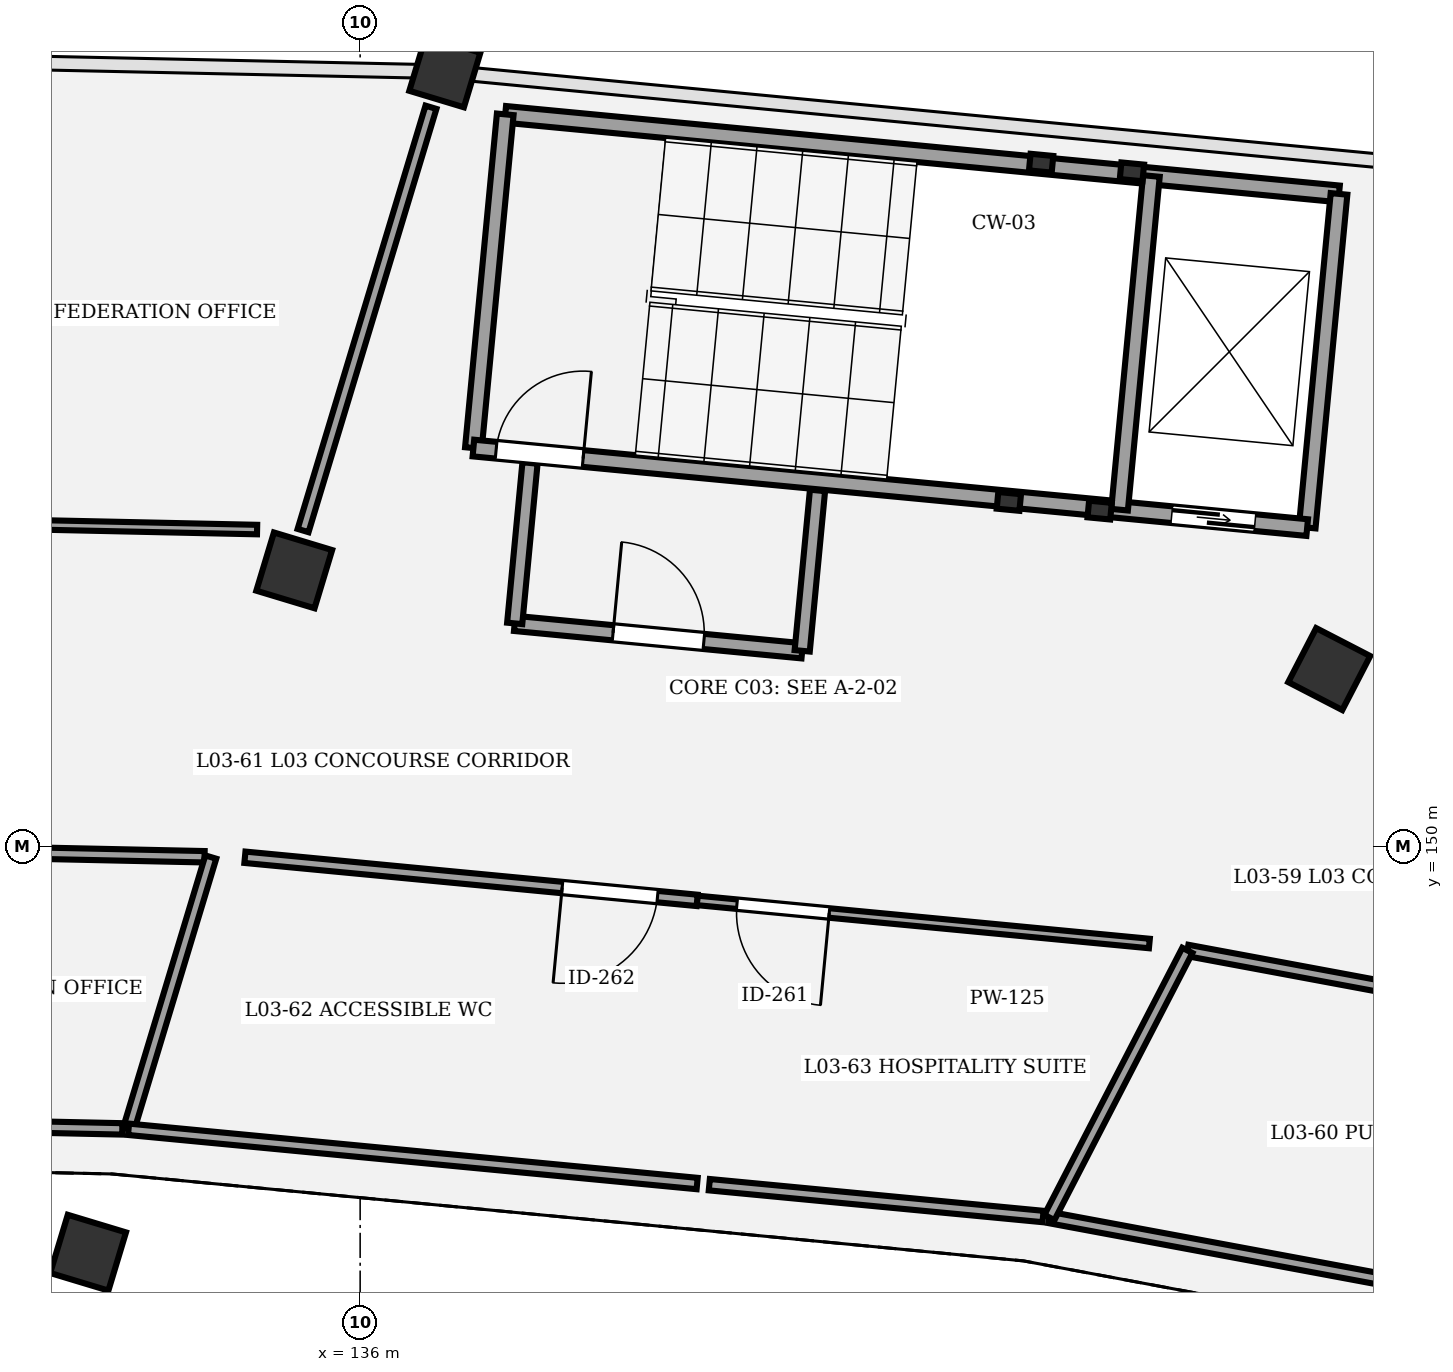
"""IFC4 building model, lengths in metres.
Left out: names, types, materials, properties, quantities, classifications, styles, units other than length and angle.
Written with IfcOpenShell. Run it as: python <this file> out.ifc"""

import sys

from ifc_helpers import new_model, si_unit, direction, frame, frame_2d, origin, origin_2d, place, context, subcontext, project, spatial, rectangle, extrude, element, fill, save


model = new_model("IFC4")
c1 = context("Model", 3, precision=1e-05, world=origin(), true_north=direction((0.0, 1.0)))
c2 = subcontext(c1, "Body", "Model", "MODEL_VIEW")
j1 = project(units=[si_unit("LENGTHUNIT", "METRE"), si_unit("PLANEANGLEUNIT", "RADIAN")], contexts=[c1])
p1 = place(None, origin())
s1 = spatial("IfcSite", under=j1, at=p1, CompositionType="ELEMENT")
p2 = place(p1, origin())
s2 = spatial("IfcBuilding", under=s1, at=p2, CompositionType="ELEMENT")
p3 = place(p2, frame((0.0, 0.0, 14.7)))
s3 = spatial("IfcBuildingStorey", under=s2, at=p3, CompositionType="ELEMENT", Elevation=14.7)
p4 = place(p3, frame((148.75, 152.335, 0.0), z_axis=(0.0, 0.0, 1.0), x_axis=(0.458959712465, 0.888457079624, 0.0)))
e1 = element("IfcColumn", 1, at=p4, inside=s3, PredefinedType="COLUMN", context=c2, shape_type="SweptSolid", body=[
    extrude(rectangle(XDim=0.8, YDim=0.8, at=origin_2d()), origin(), (0.0, 0.0, 1.0), 4.5),
])
p5 = place(p3, frame((132.42, 144.657, 0.0), z_axis=(0.0, 0.0, 1.0), x_axis=(0.289198876314, 0.957269037387, 0.0)))
e2 = element("IfcColumn", 2, at=p5, inside=s3, PredefinedType="COLUMN", context=c2, shape_type="SweptSolid", body=[
    extrude(rectangle(XDim=0.8, YDim=0.8, at=origin_2d()), origin(), (0.0, 0.0, 1.0), 2.85),
])
p6 = place(p3, frame((135.133, 153.634, 0.0), z_axis=(0.0, 0.0, 1.0), x_axis=(0.289198876314, 0.957269037387, 0.0)))
e3 = element("IfcColumn", 3, at=p6, inside=s3, PredefinedType="COLUMN", context=c2, shape_type="SweptSolid", body=[
    extrude(rectangle(XDim=0.8, YDim=0.8, at=origin_2d()), origin(), (0.0, 0.0, 1.0), 4.5),
])
p7 = place(p3, frame((137.115, 160.194, 0.0), z_axis=(0.0, 0.0, 1.0), x_axis=(0.289198876314, 0.957269037387, 0.0)))
e4 = element("IfcColumn", 4, at=p7, inside=s3, PredefinedType="COLUMN", context=c2, shape_type="SweptSolid", body=[
    extrude(rectangle(XDim=0.75, YDim=0.75, at=origin_2d()), origin(), (0.0, 0.0, 1.0), 4.5),
])
for number, where, z_axis, x_axis in (
    (5, (144.535, 154.541, 0.0), (0.0, 0.0, 1.0), (0.995, -0.095, 0.0)),
    (6, (145.73, 154.427, 0.0), (0.0, 0.0, 1.0), (0.995, -0.095, 0.0)),
    (7, (146.154, 158.877, 0.0), (0.0, 0.0, 1.0), (0.995, -0.095, 0.0)),
    (8, (144.96, 158.991, 0.0), (0.0, 0.0, 1.0), (0.995, -0.095, 0.0)),
):
    element("IfcColumn", number, at=place(p3, frame(where, z_axis=z_axis, x_axis=x_axis)), inside=s3, PredefinedType="COLUMN", context=c2, shape_type="SweptSolid", body=[
        extrude(rectangle(XDim=0.3, YDim=0.22, at=origin_2d()), origin(), (0.0, 0.0, 1.0), 4.5),
    ])
p8 = place(p3, frame((137.909, 159.634, 0.0), z_axis=(0.0, 0.0, 1.0), x_axis=(0.99547962713, -0.094975322952, 0.0)))
e9 = element("IfcWall", 9, at=p8, inside=s3, PredefinedType="SHEAR", context=c2, shape_type="SweptSolid", body=[
    extrude(rectangle(XDim=11.02, YDim=0.22, at=frame_2d((5.51, 0.0))), origin(), (0.0, 0.0, 1.0), 4.25),
])
p9 = place(p3, frame((137.49, 155.243, 0.0), z_axis=(0.0, 0.0, 1.0), x_axis=(0.094997189401, 0.995477540684, 0.0)))
e10 = element("IfcWall", 10, at=p9, inside=s3, PredefinedType="SHEAR", context=c2, shape_type="SweptSolid", body=[
    extrude(rectangle(XDim=4.41, YDim=0.22, at=frame_2d((2.205, 0.0))), origin(), (0.0, 0.0, 1.0), 4.25),
])
p10 = place(p3, frame((148.46, 154.197, 0.0), z_axis=(0.0, 0.0, 1.0), x_axis=(0.095002424918, 0.995477041051, 0.0)))
e11 = element("IfcWall", 11, at=p10, inside=s3, PredefinedType="SHEAR", context=c2, shape_type="SweptSolid", body=[
    extrude(rectangle(XDim=4.41, YDim=0.22, at=frame_2d((2.205, 0.0))), origin(), (0.0, 0.0, 1.0), 4.25),
])
p11 = place(p3, frame((137.49, 155.243, 0.0), z_axis=(0.0, 0.0, 1.0), x_axis=(0.995481721489, -0.094953368458, 0.0)))
e12 = element("IfcWall", 12, at=p11, inside=s3, PredefinedType="SHEAR", context=c2, shape_type="SweptSolid", body=[
    extrude(rectangle(XDim=11.02, YDim=0.22, at=frame_2d((5.51, 0.0))), origin(), (0.0, 0.0, 1.0), 4.25),
])
p12 = place(p11, frame((0.3, 0.0, 0.0)))
e13 = element("IfcOpeningElement", 13, at=p12, cuts=e12, PredefinedType="OPENING", context=c2, shape_type="SweptSolid", body=[
    extrude(rectangle(XDim=1.15, YDim=2.15, at=frame_2d((0.575, 1.075))), frame((0.0, 0.12, 0.0), z_axis=(0.0, -1.0, 0.0), x_axis=(1.0, 0.0, 0.0)), (0.0, 0.0, 1.0), 0.24),
])
p13 = place(p11, frame((9.23, 0.0, 0.0)))
e14 = element("IfcOpeningElement", 14, at=p13, cuts=e12, PredefinedType="OPENING", context=c2, shape_type="SweptSolid", body=[
    extrude(rectangle(XDim=1.1, YDim=2.15, at=frame_2d((0.55, 1.075))), frame((0.0, 0.12, 0.0), z_axis=(0.0, -1.0, 0.0), x_axis=(1.0, 0.0, 0.0)), (0.0, 0.0, 1.0), 0.24),
])
p14 = place(p3, frame((145.991, 154.432, 0.0), z_axis=(0.0, 0.0, 1.0), x_axis=(0.094997189401, 0.995477540684, 0.0)))
e15 = element("IfcWall", 15, at=p14, inside=s3, PredefinedType="SHEAR", context=c2, shape_type="SweptSolid", body=[
    extrude(rectangle(XDim=4.41, YDim=0.22, at=frame_2d((2.205, 0.0))), origin(), (0.0, 0.0, 1.0), 4.25),
])
p15 = place(p3, frame((138.033, 152.937, 0.0), z_axis=(0.0, 0.0, 1.0), x_axis=(0.995481022971, -0.094960691361, 0.0)))
e16 = element("IfcWall", 16, at=p15, inside=s3, PredefinedType="PARTITIONING", context=c2, shape_type="SweptSolid", body=[
    extrude(rectangle(XDim=3.8, YDim=0.2, at=frame_2d((1.9, 0.0))), origin(), (0.0, 0.0, 1.0), 3.35),
])
p16 = place(p15, frame((1.3, 0.0, 0.0)))
e17 = element("IfcOpeningElement", 17, at=p16, cuts=e16, PredefinedType="OPENING", context=c2, shape_type="SweptSolid", body=[
    extrude(rectangle(XDim=1.2, YDim=2.18, at=frame_2d((0.6, 1.09))), frame((0.0, 0.11, 0.0), z_axis=(0.0, -1.0, 0.0), x_axis=(1.0, 0.0, 0.0)), (0.0, 0.0, 1.0), 0.22),
])
for number, where, z_axis, x_axis in (
    (18, (138.033, 152.937, 0.0), (0.0, 0.0, 1.0), (0.095, 0.995, 0.0)),
    (19, (141.816, 152.576, 0.0), (0.0, 0.0, 1.0), (0.095, 0.995, 0.0)),
):
    element("IfcWall", number, at=place(p3, frame(where, z_axis=z_axis, x_axis=x_axis)), inside=s3, PredefinedType="PARTITIONING", context=c2, shape_type="SweptSolid", body=[
        extrude(rectangle(XDim=2.12, YDim=0.2, at=frame_2d((1.06, 0.0))), origin(), (0.0, 0.0, 1.0), 3.35),
    ])
p17 = place(p3, frame((146.884, 148.635, 0.0), z_axis=(0.0, 0.0, 1.0), x_axis=(0.983097372707, -0.183083466695, 0.0)))
e20 = element("IfcWall", 20, at=p17, inside=s3, PredefinedType="PARTITIONING", context=c2, shape_type="SweptSolid", body=[
    extrude(rectangle(XDim=11.035, YDim=0.15, at=frame_2d((5.517, 0.0))), origin(), (0.0, 0.0, 1.0), 3.25),
])
p18 = place(p17, frame((4.927, 0.0, 0.0)))
e21 = element("IfcOpeningElement", 21, at=p18, cuts=e20, PredefinedType="OPENING", context=c2, shape_type="SweptSolid", body=[
    extrude(rectangle(XDim=1.18, YDim=2.1, at=frame_2d((0.59, 1.05))), frame((0.0, 0.085, 0.0), z_axis=(0.0, -1.0, 0.0), x_axis=(1.0, 0.0, 0.0)), (0.0, 0.0, 1.0), 0.17),
])
p19 = place(p3, frame((146.384, 148.725, 0.0), z_axis=(0.0, 0.0, 1.0), x_axis=(-0.995487942551, 0.094888124843, 0.0)))
e22 = element("IfcWall", 22, at=p19, inside=s3, PredefinedType="PARTITIONING", context=c2, shape_type="SweptSolid", body=[
    extrude(rectangle(XDim=5.977, YDim=0.125, at=frame_2d((2.988, 0.0))), origin(), (0.0, 0.0, 1.0), 3.25),
])
p20 = place(p19, frame((4.231, 0.0, 0.0)))
e23 = element("IfcOpeningElement", 23, at=p20, cuts=e22, PredefinedType="OPENING", context=c2, shape_type="SweptSolid", body=[
    extrude(rectangle(XDim=1.22, YDim=2.1, at=frame_2d((0.61, 1.05))), frame((0.0, 0.073, 0.0), z_axis=(0.0, -1.0, 0.0), x_axis=(1.0, 0.0, 0.0)), (0.0, 0.0, 1.0), 0.145),
])
p21 = place(p3, frame((140.434, 149.292, 0.0), z_axis=(0.0, 0.0, 1.0), x_axis=(-0.995484083314, 0.094928604063, 0.0)))
e24 = element("IfcWall", 24, at=p21, inside=s3, PredefinedType="PARTITIONING", context=c2, shape_type="SweptSolid", body=[
    extrude(rectangle(XDim=5.977, YDim=0.15, at=frame_2d((2.989, 0.0))), origin(), (0.0, 0.0, 1.0), 3.25),
])
p22 = place(p21, frame((0.524, 0.0, 0.0)))
e25 = element("IfcOpeningElement", 25, at=p22, cuts=e24, PredefinedType="OPENING", context=c2, shape_type="SweptSolid", body=[
    extrude(rectangle(XDim=1.26, YDim=2.1, at=frame_2d((0.63, 1.05))), frame((0.0, 0.085, 0.0), z_axis=(0.0, -1.0, 0.0), x_axis=(1.0, 0.0, 0.0)), (0.0, 0.0, 1.0), 0.17),
])
p23 = place(p3, frame((115.04, 150.274, 0.0), z_axis=(0.0, 0.0, 1.0), x_axis=(0.999768266483, -0.021527037261, 0.0)))
e26 = element("IfcWall", 26, at=p23, inside=s3, PredefinedType="PARTITIONING", context=c2, shape_type="SweptSolid", body=[
    extrude(rectangle(XDim=18.917, YDim=0.15, at=frame_2d((9.458, 0.0))), origin(), (0.0, 0.0, 1.0), 3.25),
])
p24 = place(p23, frame((8.799, 0.0, 0.0)))
e27 = element("IfcOpeningElement", 27, at=p24, cuts=e26, PredefinedType="OPENING", context=c2, shape_type="SweptSolid", body=[
    extrude(rectangle(XDim=1.32, YDim=2.1, at=frame_2d((0.66, 1.05))), frame((0.0, 0.085, 0.0), z_axis=(0.0, -1.0, 0.0), x_axis=(1.0, 0.0, 0.0)), (0.0, 0.0, 1.0), 0.17),
])
p25 = place(p3, frame((134.644, 154.171, 0.0), z_axis=(0.0, 0.0, 1.0), x_axis=(-0.999768107727, 0.021534409017, 0.0)))
e28 = element("IfcWall", 28, at=p25, inside=s3, PredefinedType="PARTITIONING", context=c2, shape_type="SweptSolid", body=[
    extrude(rectangle(XDim=19.137, YDim=0.125, at=frame_2d((9.569, 0.0))), origin(), (0.0, 0.0, 1.0), 3.25),
])
p26 = place(p25, frame((8.869, 0.0, 0.0)))
e29 = element("IfcOpeningElement", 29, at=p26, cuts=e28, PredefinedType="OPENING", context=c2, shape_type="SweptSolid", body=[
    extrude(rectangle(XDim=1.4, YDim=2.1, at=frame_2d((0.7, 1.05))), frame((0.0, 0.073, 0.0), z_axis=(0.0, -1.0, 0.0), x_axis=(1.0, 0.0, 0.0)), (0.0, 0.0, 1.0), 0.145),
])
p27 = place(p3, frame((155.293, 143.216, 0.0), z_axis=(0.0, 0.0, 1.0), x_axis=(-0.983096264982, 0.183089414709, 0.0)))
e30 = element("IfcWall", 30, at=p27, inside=s3, PredefinedType="PARTITIONING", context=c2, shape_type="SweptSolid", body=[
    extrude(rectangle(XDim=10.401, YDim=0.15, at=frame_2d((5.2, 0.0))), origin(), (0.0, 0.0, 1.0), 3.25),
])
p28 = place(p3, frame((145.068, 145.121, 0.0), z_axis=(0.0, 0.0, 1.0), x_axis=(0.459001375355, 0.888435556145, 0.0)))
e31 = element("IfcWall", 31, at=p28, inside=s3, PredefinedType="PARTITIONING", context=c2, shape_type="SweptSolid", body=[
    extrude(rectangle(XDim=3.955, YDim=0.15, at=frame_2d((1.978, 0.0))), origin(), (0.0, 0.0, 1.0), 3.25),
])
p29 = place(p3, frame((132.953, 146.281, 0.0), z_axis=(0.0, 0.0, 1.0), x_axis=(0.289262971577, 0.957249671337, 0.0)))
e32 = element("IfcWall", 32, at=p29, inside=s3, PredefinedType="PARTITIONING", context=c2, shape_type="SweptSolid", body=[
    extrude(rectangle(XDim=3.741, YDim=0.15, at=frame_2d((1.871, 0.0))), origin(), (0.0, 0.0, 1.0), 3.25),
])
p30 = place(p3, frame((140.434, 145.567, 0.0), z_axis=(0.0, 0.0, 1.0), x_axis=(-0.995484369257, 0.094925605423, 0.0)))
e33 = element("IfcWall", 33, at=p30, inside=s3, PredefinedType="PARTITIONING", context=c2, shape_type="SweptSolid", body=[
    extrude(rectangle(XDim=7.515, YDim=0.15, at=frame_2d((3.758, 0.0))), origin(), (0.0, 0.0, 1.0), 3.25),
])
p31 = place(p3, frame((144.985, 145.133, 0.0), z_axis=(0.0, 0.0, 1.0), x_axis=(-0.995484271109, 0.094926634693, 0.0)))
e34 = element("IfcWall", 34, at=p31, inside=s3, PredefinedType="PARTITIONING", context=c2, shape_type="SweptSolid", body=[
    extrude(rectangle(XDim=4.411, YDim=0.15, at=frame_2d((2.206, 0.0))), origin(), (0.0, 0.0, 1.0), 3.25),
])
p32 = place(p3, frame((132.871, 146.286, 0.0), z_axis=(0.0, 0.0, 1.0), x_axis=(-0.999768146144, 0.02153262537, 0.0)))
e35 = element("IfcWall", 35, at=p32, inside=s3, PredefinedType="PARTITIONING", context=c2, shape_type="SweptSolid", body=[
    extrude(rectangle(XDim=17.835, YDim=0.15, at=frame_2d((8.917, 0.0))), origin(), (0.0, 0.0, 1.0), 3.25),
])
p33 = place(p3, frame((136.932, 159.727, 0.0), z_axis=(0.0, 0.0, 1.0), x_axis=(-0.289195444178, -0.957270074256, 0.0)))
e36 = element("IfcWall", 36, at=p33, inside=s3, PredefinedType="PARTITIONING", context=c2, shape_type="SweptSolid", body=[
    extrude(rectangle(XDim=5.817, YDim=0.15, at=frame_2d((2.909, 0.0))), origin(), (0.0, 0.0, 1.0), 3.25),
])
p34 = place(p12, origin())
e37 = element("IfcDoor", 37, at=p34, inside=s3, OperationType="SINGLE_SWING_RIGHT", PredefinedType="DOOR", context=c2, shape_type="SweptSolid", body=[
    extrude(rectangle(XDim=1.15, YDim=2.15, at=frame_2d((0.575, 1.075))), frame((0.0, 0.025, 0.0), z_axis=(0.0, -1.0, 0.0), x_axis=(1.0, 0.0, 0.0)), (0.0, 0.0, 1.0), 0.05),
])
fill(e13, e37)
p35 = place(p13, origin())
e38 = element("IfcDoor", 38, at=p35, inside=s3, OperationType="DOUBLE_DOOR_SLIDING", PredefinedType="DOOR", context=c2, shape_type="SweptSolid", body=[
    extrude(rectangle(XDim=1.1, YDim=2.15, at=frame_2d((0.55, 1.075))), frame((0.0, 0.025, 0.0), z_axis=(0.0, -1.0, 0.0), x_axis=(1.0, 0.0, 0.0)), (0.0, 0.0, 1.0), 0.05),
])
fill(e14, e38)
p36 = place(p16, origin())
e39 = element("IfcDoor", 39, at=p36, inside=s3, OperationType="SINGLE_SWING_LEFT", PredefinedType="DOOR", context=c2, shape_type="SweptSolid", body=[
    extrude(rectangle(XDim=1.2, YDim=2.18, at=frame_2d((0.6, 1.09))), frame((0.0, 0.025, 0.0), z_axis=(0.0, -1.0, 0.0), x_axis=(1.0, 0.0, 0.0)), (0.0, 0.0, 1.0), 0.05),
])
fill(e17, e39)
p37 = place(p20, origin())
e40 = element("IfcDoor", 40, at=p37, inside=s3, OperationType="SINGLE_SWING_LEFT", PredefinedType="DOOR", context=c2, shape_type="SweptSolid", body=[
    extrude(rectangle(XDim=1.22, YDim=2.1, at=frame_2d((0.61, 1.05))), frame((0.0, 0.025, 0.0), z_axis=(0.0, -1.0, 0.0), x_axis=(1.0, 0.0, 0.0)), (0.0, 0.0, 1.0), 0.05),
])
fill(e23, e40)
p38 = place(p22, origin())
e41 = element("IfcDoor", 41, at=p38, inside=s3, OperationType="SINGLE_SWING_RIGHT", PredefinedType="DOOR", context=c2, shape_type="SweptSolid", body=[
    extrude(rectangle(XDim=1.26, YDim=2.1, at=frame_2d((0.63, 1.05))), frame((0.0, 0.025, 0.0), z_axis=(0.0, -1.0, 0.0), x_axis=(1.0, 0.0, 0.0)), (0.0, 0.0, 1.0), 0.05),
])
fill(e25, e41)
save(model, sys.argv[1])
